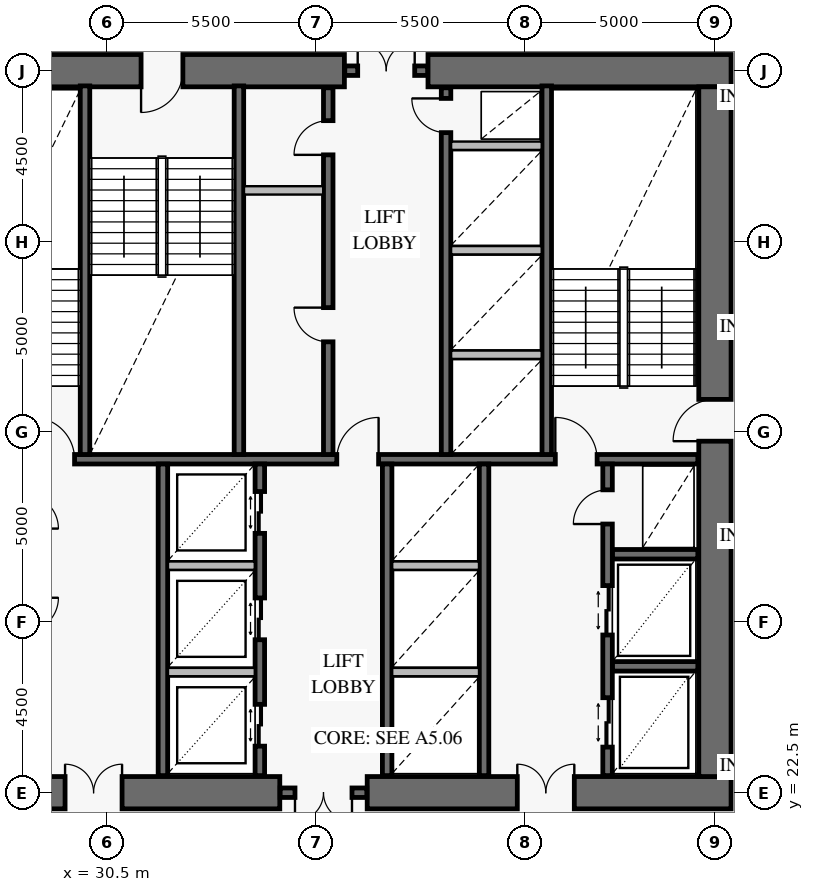
"""IFC4 building model, lengths in metres.
Left out: names, types, materials, properties, quantities, classifications, styles, units other than length and angle.
Written with IfcOpenShell. Run it as: python <this file> out.ifc"""

import sys

from ifc_helpers import new_model, si_unit, direction, frame, frame_2d, origin, place, context, subcontext, project, spatial, rectangle, extrude, element, fill, save


model = new_model("IFC4")
c1 = context("Model", 3, precision=1e-05, world=origin(), true_north=direction((0.0, 1.0)))
c2 = subcontext(c1, "Body", "Model", "MODEL_VIEW")
j1 = project(units=[si_unit("LENGTHUNIT", "METRE"), si_unit("PLANEANGLEUNIT", "RADIAN")], contexts=[c1])
p1 = place(None, origin())
s1 = spatial("IfcSite", under=j1, at=p1, CompositionType="ELEMENT")
p2 = place(p1, origin())
s2 = spatial("IfcBuilding", under=s1, at=p2, CompositionType="ELEMENT")
p3 = place(p2, frame((0.0, 0.0, 66.6)))
s3 = spatial("IfcBuildingStorey", under=s2, at=p3, CompositionType="ELEMENT", Elevation=66.6)
p4 = place(p3, frame((25.075, 22.5, 0.0), z_axis=(0.0, 0.0, 1.0), x_axis=(1.0, 0.0, 0.0)))
e1 = element("IfcWall", 1, at=p4, inside=s3, PredefinedType="SHEAR", context=c2, shape_type="SweptSolid", body=[
    extrude(rectangle(XDim=9.975, YDim=0.85, at=frame_2d((4.988, 0.0))), origin(), (0.0, 0.0, 1.0), 4.2),
])
p5 = place(p4, frame((4.325, 0.0, 0.0)))
e2 = element("IfcOpeningElement", 2, at=p5, cuts=e1, PredefinedType="OPENING", context=c2, shape_type="SweptSolid", body=[
    extrude(rectangle(XDim=1.5, YDim=2.15, at=frame_2d((0.75, 1.075))), frame((0.0, 0.437, 0.0), z_axis=(0.0, -1.0, 0.0), x_axis=(1.0, 0.0, 0.0)), (0.0, 0.0, 1.0), 0.874),
])
p6 = place(p3, frame((37.35, 22.5, 0.0), z_axis=(0.0, 0.0, 1.0), x_axis=(1.0, 0.0, 0.0)))
e3 = element("IfcWall", 3, at=p6, inside=s3, PredefinedType="SHEAR", context=c2, shape_type="SweptSolid", body=[
    extrude(rectangle(XDim=9.575, YDim=0.85, at=frame_2d((4.788, 0.0))), origin(), (0.0, 0.0, 1.0), 4.2),
])
p7 = place(p6, frame((3.95, 0.0, 0.0)))
e4 = element("IfcOpeningElement", 4, at=p7, cuts=e3, PredefinedType="OPENING", context=c2, shape_type="SweptSolid", body=[
    extrude(rectangle(XDim=1.5, YDim=2.15, at=frame_2d((0.75, 1.075))), frame((0.0, 0.437, 0.0), z_axis=(0.0, -1.0, 0.0), x_axis=(1.0, 0.0, 0.0)), (0.0, 0.0, 1.0), 0.874),
])
p8 = place(p3, frame((46.925, 41.5, 0.0), z_axis=(0.0, 0.0, 1.0), x_axis=(-1.0, 0.0, 0.0)))
e5 = element("IfcWall", 5, at=p8, inside=s3, PredefinedType="SHEAR", context=c2, shape_type="SweptSolid", body=[
    extrude(rectangle(XDim=7.975, YDim=0.85, at=frame_2d((3.988, 0.0))), origin(), (0.0, 0.0, 1.0), 4.2),
])
p9 = place(p3, frame((36.75, 41.5, 0.0), z_axis=(0.0, 0.0, 1.0), x_axis=(-1.0, 0.0, 0.0)))
e6 = element("IfcWall", 6, at=p9, inside=s3, PredefinedType="SHEAR", context=c2, shape_type="SweptSolid", body=[
    extrude(rectangle(XDim=11.675, YDim=0.85, at=frame_2d((5.837, 0.0))), origin(), (0.0, 0.0, 1.0), 4.2),
])
p10 = place(p9, frame((4.25, 0.0, 0.0)))
e7 = element("IfcOpeningElement", 7, at=p10, cuts=e6, PredefinedType="OPENING", context=c2, shape_type="SweptSolid", body=[
    extrude(rectangle(XDim=1.1, YDim=2.15, at=frame_2d((0.55, 1.075))), frame((0.0, 0.437, 0.0), z_axis=(0.0, -1.0, 0.0), x_axis=(1.0, 0.0, 0.0)), (0.0, 0.0, 1.0), 0.874),
])
p11 = place(p3, frame((46.5, 22.925, 0.0), z_axis=(0.0, 0.0, 1.0), x_axis=(0.0, 1.0, 0.0)))
e8 = element("IfcWall", 8, at=p11, inside=s3, PredefinedType="SHEAR", context=c2, shape_type="SweptSolid", body=[
    extrude(rectangle(XDim=18.15, YDim=0.85, at=frame_2d((9.075, 0.0))), origin(), (0.0, 0.0, 1.0), 4.2),
])
p12 = place(p11, frame((8.825, 0.0, 0.0)))
e9 = element("IfcOpeningElement", 9, at=p12, cuts=e8, PredefinedType="OPENING", context=c2, shape_type="SweptSolid", body=[
    extrude(rectangle(XDim=1.1, YDim=2.15, at=frame_2d((0.55, 1.075))), frame((0.0, 0.437, 0.0), z_axis=(0.0, -1.0, 0.0), x_axis=(1.0, 0.0, 0.0)), (0.0, 0.0, 1.0), 0.874),
])
p13 = place(p3, frame((35.06, 22.5, 0.0), z_axis=(0.0, 0.0, 1.0), x_axis=(1.0, 0.0, 0.0)))
e10 = element("IfcWall", 10, at=p13, inside=s3, PredefinedType="SOLIDWALL", context=c2, shape_type="SweptSolid", body=[
    extrude(rectangle(XDim=2.28, YDim=0.25, at=frame_2d((1.14, 0.0))), origin(), (0.0, 0.0, 1.0), 4.2),
])
p14 = place(p13, frame((0.39, 0.0, 0.0)))
e11 = element("IfcOpeningElement", 11, at=p14, cuts=e10, PredefinedType="OPENING", context=c2, shape_type="SweptSolid", body=[
    extrude(rectangle(XDim=1.5, YDim=2.15, at=frame_2d((0.75, 1.075))), frame((0.0, 0.137, 0.0), z_axis=(0.0, -1.0, 0.0), x_axis=(1.0, 0.0, 0.0)), (0.0, 0.0, 1.0), 0.274),
])
p15 = place(p3, frame((36.76, 41.5, 0.0), z_axis=(0.0, 0.0, 1.0), x_axis=(1.0, 0.0, 0.0)))
e12 = element("IfcWall", 12, at=p15, inside=s3, PredefinedType="SOLIDWALL", context=c2, shape_type="SweptSolid", body=[
    extrude(rectangle(XDim=2.18, YDim=0.25, at=frame_2d((1.09, 0.0))), origin(), (0.0, 0.0, 1.0), 4.2),
])
p16 = place(p15, frame((0.34, 0.0, 0.0)))
e13 = element("IfcOpeningElement", 13, at=p16, cuts=e12, PredefinedType="OPENING", context=c2, shape_type="SweptSolid", body=[
    extrude(rectangle(XDim=1.5, YDim=2.15, at=frame_2d((0.75, 1.075))), frame((0.0, 0.137, 0.0), z_axis=(0.0, -1.0, 0.0), x_axis=(1.0, 0.0, 0.0)), (0.0, 0.0, 1.0), 0.274),
])
p17 = place(p3, frame((25.95, 31.275, 0.0), z_axis=(0.0, 0.0, 1.0), x_axis=(1.0, 0.0, 0.0)))
e14 = element("IfcWall", 14, at=p17, inside=s3, PredefinedType="SOLIDWALL", context=c2, shape_type="SweptSolid", body=[
    extrude(rectangle(XDim=20.1, YDim=0.25, at=frame_2d((10.05, 0.0))), origin(), (0.0, 0.0, 1.0), 4.2),
])
p18 = place(p17, frame((2.6, 0.0, 0.0)))
e15 = element("IfcOpeningElement", 15, at=p18, cuts=e14, PredefinedType="OPENING", context=c2, shape_type="SweptSolid", body=[
    extrude(rectangle(XDim=1.1, YDim=2.15, at=frame_2d((0.55, 1.075))), frame((0.0, 0.137, 0.0), z_axis=(0.0, -1.0, 0.0), x_axis=(1.0, 0.0, 0.0)), (0.0, 0.0, 1.0), 0.274),
])
p19 = place(p17, frame((10.6, 0.0, 0.0)))
e16 = element("IfcOpeningElement", 16, at=p19, cuts=e14, PredefinedType="OPENING", context=c2, shape_type="SweptSolid", body=[
    extrude(rectangle(XDim=1.1, YDim=2.15, at=frame_2d((0.55, 1.075))), frame((0.0, 0.137, 0.0), z_axis=(0.0, -1.0, 0.0), x_axis=(1.0, 0.0, 0.0)), (0.0, 0.0, 1.0), 0.274),
])
p20 = place(p17, frame((16.35, 0.0, 0.0)))
e17 = element("IfcOpeningElement", 17, at=p20, cuts=e14, PredefinedType="OPENING", context=c2, shape_type="SweptSolid", body=[
    extrude(rectangle(XDim=1.1, YDim=2.15, at=frame_2d((0.55, 1.075))), frame((0.0, 0.137, 0.0), z_axis=(0.0, -1.0, 0.0), x_axis=(1.0, 0.0, 0.0)), (0.0, 0.0, 1.0), 0.274),
])
for number, where, z_axis, x_axis in (
    (18, (29.925, 31.4, 0.0), (0.0, 0.0, 1.0), (0.0, 1.0, 0.0)),
    (19, (33.975, 31.4, 0.0), (0.0, 0.0, 1.0), (0.0, 1.0, 0.0)),
    (20, (42.075, 31.4, 0.0), (0.0, 0.0, 1.0), (0.0, 1.0, 0.0)),
):
    element("IfcWall", number, at=place(p3, frame(where, z_axis=z_axis, x_axis=x_axis)), inside=s3, PredefinedType="SOLIDWALL", context=c2, shape_type="SweptSolid", body=[
        extrude(rectangle(XDim=9.7, YDim=0.25, at=frame_2d((4.85, 0.0))), origin(), (0.0, 0.0, 1.0), 4.2),
    ])
p21 = place(p3, frame((36.325, 31.4, 0.0), z_axis=(0.0, 0.0, 1.0), x_axis=(0.0, 1.0, 0.0)))
e21 = element("IfcWall", 21, at=p21, inside=s3, PredefinedType="SOLIDWALL", context=c2, shape_type="SweptSolid", body=[
    extrude(rectangle(XDim=9.65, YDim=0.25, at=frame_2d((4.825, 0.0))), origin(), (0.0, 0.0, 1.0), 4.2),
])
p22 = place(p21, frame((2.965, 0.0, 0.0)))
e22 = element("IfcOpeningElement", 22, at=p22, cuts=e21, PredefinedType="OPENING", context=c2, shape_type="SweptSolid", body=[
    extrude(rectangle(XDim=0.9, YDim=2.1, at=frame_2d((0.45, 1.05))), frame((0.0, 0.137, 0.0), z_axis=(0.0, -1.0, 0.0), x_axis=(1.0, 0.0, 0.0)), (0.0, 0.0, 1.0), 0.274),
])
p23 = place(p21, frame((7.885, 0.0, 0.0)))
e23 = element("IfcOpeningElement", 23, at=p23, cuts=e21, PredefinedType="OPENING", context=c2, shape_type="SweptSolid", body=[
    extrude(rectangle(XDim=0.9, YDim=2.1, at=frame_2d((0.45, 1.05))), frame((0.0, 0.137, 0.0), z_axis=(0.0, -1.0, 0.0), x_axis=(1.0, 0.0, 0.0)), (0.0, 0.0, 1.0), 0.274),
])
p24 = place(p3, frame((39.425, 31.4, 0.0), z_axis=(0.0, 0.0, 1.0), x_axis=(0.0, 1.0, 0.0)))
e24 = element("IfcWall", 24, at=p24, inside=s3, PredefinedType="SOLIDWALL", context=c2, shape_type="SweptSolid", body=[
    extrude(rectangle(XDim=9.65, YDim=0.25, at=frame_2d((4.825, 0.0))), origin(), (0.0, 0.0, 1.0), 4.2),
])
p25 = place(p24, frame((8.47, 0.0, 0.0)))
e25 = element("IfcOpeningElement", 25, at=p25, cuts=e24, PredefinedType="OPENING", context=c2, shape_type="SweptSolid", body=[
    extrude(rectangle(XDim=0.9, YDim=2.1, at=frame_2d((0.45, 1.05))), frame((0.0, 0.137, 0.0), z_axis=(0.0, -1.0, 0.0), x_axis=(1.0, 0.0, 0.0)), (0.0, 0.0, 1.0), 0.274),
])
p26 = place(p3, frame((31.975, 22.95, 0.0), z_axis=(0.0, 0.0, 1.0), x_axis=(0.0, 1.0, 0.0)))
e26 = element("IfcWall", 26, at=p26, inside=s3, PredefinedType="SOLIDWALL", context=c2, shape_type="SweptSolid", body=[
    extrude(rectangle(XDim=8.2, YDim=0.25, at=frame_2d((4.1, 0.0))), origin(), (0.0, 0.0, 1.0), 4.2),
])
p27 = place(p3, frame((34.525, 22.95, 0.0), z_axis=(0.0, 0.0, 1.0), x_axis=(0.0, 1.0, 0.0)))
e27 = element("IfcWall", 27, at=p27, inside=s3, PredefinedType="SOLIDWALL", context=c2, shape_type="SweptSolid", body=[
    extrude(rectangle(XDim=8.2, YDim=0.25, at=frame_2d((4.1, 0.0))), origin(), (0.0, 0.0, 1.0), 4.2),
])
p28 = place(p27, frame((0.775, 0.0, 0.0)))
e28 = element("IfcOpeningElement", 28, at=p28, cuts=e27, PredefinedType="OPENING", context=c2, shape_type="SweptSolid", body=[
    extrude(rectangle(XDim=1.1, YDim=2.2, at=frame_2d((0.55, 1.1))), frame((0.0, 0.137, 0.0), z_axis=(0.0, -1.0, 0.0), x_axis=(1.0, 0.0, 0.0)), (0.0, 0.0, 1.0), 0.274),
])
p29 = place(p27, frame((3.575, 0.0, 0.0)))
e29 = element("IfcOpeningElement", 29, at=p29, cuts=e27, PredefinedType="OPENING", context=c2, shape_type="SweptSolid", body=[
    extrude(rectangle(XDim=1.1, YDim=2.2, at=frame_2d((0.55, 1.1))), frame((0.0, 0.137, 0.0), z_axis=(0.0, -1.0, 0.0), x_axis=(1.0, 0.0, 0.0)), (0.0, 0.0, 1.0), 0.274),
])
p30 = place(p27, frame((6.375, 0.0, 0.0)))
e30 = element("IfcOpeningElement", 30, at=p30, cuts=e27, PredefinedType="OPENING", context=c2, shape_type="SweptSolid", body=[
    extrude(rectangle(XDim=1.1, YDim=2.2, at=frame_2d((0.55, 1.1))), frame((0.0, 0.137, 0.0), z_axis=(0.0, -1.0, 0.0), x_axis=(1.0, 0.0, 0.0)), (0.0, 0.0, 1.0), 0.274),
])
for number, where, z_axis, x_axis in (
    (31, (37.875, 22.95, 0.0), (0.0, 0.0, 1.0), (0.0, 1.0, 0.0)),
    (32, (40.425, 22.95, 0.0), (0.0, 0.0, 1.0), (0.0, 1.0, 0.0)),
):
    element("IfcWall", number, at=place(p3, frame(where, z_axis=z_axis, x_axis=x_axis)), inside=s3, PredefinedType="SOLIDWALL", context=c2, shape_type="SweptSolid", body=[
        extrude(rectangle(XDim=8.2, YDim=0.25, at=frame_2d((4.1, 0.0))), origin(), (0.0, 0.0, 1.0), 4.2),
    ])
for number, where, z_axis, x_axis in (
    (33, (43.8, 25.825, 0.0), (0.0, 0.0, 1.0), (1.0, 0.0, 0.0)),
    (34, (43.8, 28.775, 0.0), (0.0, 0.0, 1.0), (1.0, 0.0, 0.0)),
):
    element("IfcWall", number, at=place(p3, frame(where, z_axis=z_axis, x_axis=x_axis)), inside=s3, PredefinedType="SOLIDWALL", context=c2, shape_type="SweptSolid", body=[
        extrude(rectangle(XDim=2.25, YDim=0.25, at=frame_2d((1.125, 0.0))), origin(), (0.0, 0.0, 1.0), 4.2),
    ])
p31 = place(p3, frame((43.675, 22.95, 0.0), z_axis=(0.0, 0.0, 1.0), x_axis=(0.0, 1.0, 0.0)))
e35 = element("IfcWall", 35, at=p31, inside=s3, PredefinedType="SOLIDWALL", context=c2, shape_type="SweptSolid", body=[
    extrude(rectangle(XDim=8.2, YDim=0.25, at=frame_2d((4.1, 0.0))), origin(), (0.0, 0.0, 1.0), 4.2),
])
p32 = place(p31, frame((0.75, 0.0, 0.0)))
e36 = element("IfcOpeningElement", 36, at=p32, cuts=e35, PredefinedType="OPENING", context=c2, shape_type="SweptSolid", body=[
    extrude(rectangle(XDim=1.3, YDim=2.3, at=frame_2d((0.65, 1.15))), frame((0.0, 0.137, 0.0), z_axis=(0.0, -1.0, 0.0), x_axis=(1.0, 0.0, 0.0)), (0.0, 0.0, 1.0), 0.274),
])
p33 = place(p31, frame((3.7, 0.0, 0.0)))
e37 = element("IfcOpeningElement", 37, at=p33, cuts=e35, PredefinedType="OPENING", context=c2, shape_type="SweptSolid", body=[
    extrude(rectangle(XDim=1.3, YDim=2.3, at=frame_2d((0.65, 1.15))), frame((0.0, 0.137, 0.0), z_axis=(0.0, -1.0, 0.0), x_axis=(1.0, 0.0, 0.0)), (0.0, 0.0, 1.0), 0.274),
])
p34 = place(p31, frame((6.62, 0.0, 0.0)))
e38 = element("IfcOpeningElement", 38, at=p34, cuts=e35, PredefinedType="OPENING", context=c2, shape_type="SweptSolid", body=[
    extrude(rectangle(XDim=0.9, YDim=2.1, at=frame_2d((0.45, 1.05))), frame((0.0, 0.137, 0.0), z_axis=(0.0, -1.0, 0.0), x_axis=(1.0, 0.0, 0.0)), (0.0, 0.0, 1.0), 0.274),
])
p35 = place(p3, frame((34.108, 38.35, 0.0), z_axis=(0.0, 0.0, 1.0), x_axis=(1.0, 0.0, 0.0)))
e39 = element("IfcWall", 39, at=p35, inside=s3, PredefinedType="PARTITIONING", context=c2, shape_type="SweptSolid", body=[
    extrude(rectangle(XDim=2.084, YDim=0.22, at=frame_2d((1.042, 0.0))), origin(), (0.0, 0.0, 1.0), 3.92),
])
for number, where, z_axis, x_axis in (
    (40, (39.558, 34.025, 0.0), (0.0, 0.0, 1.0), (1.0, 0.0, 0.0)),
    (41, (39.558, 36.775, 0.0), (0.0, 0.0, 1.0), (1.0, 0.0, 0.0)),
    (42, (39.558, 39.525, 0.0), (0.0, 0.0, 1.0), (1.0, 0.0, 0.0)),
):
    element("IfcWall", number, at=place(p3, frame(where, z_axis=z_axis, x_axis=x_axis)), inside=s3, PredefinedType="PARTITIONING", context=c2, shape_type="SweptSolid", body=[
        extrude(rectangle(XDim=2.384, YDim=0.22, at=frame_2d((1.192, 0.0))), origin(), (0.0, 0.0, 1.0), 3.92),
    ])
for number, where, z_axis, x_axis in (
    (43, (32.108, 25.675, 0.0), (0.0, 0.0, 1.0), (1.0, 0.0, 0.0)),
    (44, (32.108, 28.475, 0.0), (0.0, 0.0, 1.0), (1.0, 0.0, 0.0)),
):
    element("IfcWall", number, at=place(p3, frame(where, z_axis=z_axis, x_axis=x_axis)), inside=s3, PredefinedType="PARTITIONING", context=c2, shape_type="SweptSolid", body=[
        extrude(rectangle(XDim=2.284, YDim=0.22, at=frame_2d((1.142, 0.0))), origin(), (0.0, 0.0, 1.0), 3.92),
    ])
for number, where, z_axis, x_axis in (
    (45, (38.008, 25.675, 0.0), (0.0, 0.0, 1.0), (1.0, 0.0, 0.0)),
    (46, (38.008, 28.475, 0.0), (0.0, 0.0, 1.0), (1.0, 0.0, 0.0)),
):
    element("IfcWall", number, at=place(p3, frame(where, z_axis=z_axis, x_axis=x_axis)), inside=s3, PredefinedType="PARTITIONING", context=c2, shape_type="SweptSolid", body=[
        extrude(rectangle(XDim=2.284, YDim=0.22, at=frame_2d((1.142, 0.0))), origin(), (0.0, 0.0, 1.0), 3.92),
    ])
p36 = place(p12, origin())
e47 = element("IfcDoor", 47, at=p36, inside=s3, OperationType="SINGLE_SWING_LEFT", PredefinedType="USERDEFINED", context=c2, shape_type="SweptSolid", body=[
    extrude(rectangle(XDim=1.1, YDim=2.15, at=frame_2d((0.55, 1.075))), frame((0.0, 0.025, 0.0), z_axis=(0.0, -1.0, 0.0), x_axis=(1.0, 0.0, 0.0)), (0.0, 0.0, 1.0), 0.05),
])
fill(e9, e47)
p37 = place(p10, origin())
e48 = element("IfcDoor", 48, at=p37, inside=s3, OperationType="SINGLE_SWING_RIGHT", PredefinedType="USERDEFINED", context=c2, shape_type="SweptSolid", body=[
    extrude(rectangle(XDim=1.1, YDim=2.15, at=frame_2d((0.55, 1.075))), frame((0.0, 0.025, 0.0), z_axis=(0.0, -1.0, 0.0), x_axis=(1.0, 0.0, 0.0)), (0.0, 0.0, 1.0), 0.05),
])
fill(e7, e48)
p38 = place(p5, origin())
e49 = element("IfcDoor", 49, at=p38, inside=s3, OperationType="DOUBLE_DOOR_SINGLE_SWING", PredefinedType="DOOR", context=c2, shape_type="SweptSolid", body=[
    extrude(rectangle(XDim=1.5, YDim=2.15, at=frame_2d((0.75, 1.075))), frame((0.0, 0.025, 0.0), z_axis=(0.0, -1.0, 0.0), x_axis=(1.0, 0.0, 0.0)), (0.0, 0.0, 1.0), 0.05),
])
fill(e2, e49)
p39 = place(p7, origin())
e50 = element("IfcDoor", 50, at=p39, inside=s3, OperationType="DOUBLE_DOOR_SINGLE_SWING", PredefinedType="DOOR", context=c2, shape_type="SweptSolid", body=[
    extrude(rectangle(XDim=1.5, YDim=2.15, at=frame_2d((0.75, 1.075))), frame((0.0, 0.025, 0.0), z_axis=(0.0, -1.0, 0.0), x_axis=(1.0, 0.0, 0.0)), (0.0, 0.0, 1.0), 0.05),
])
fill(e4, e50)
p40 = place(p14, frame((1.5, 0.0, 0.0), z_axis=(0.0, 0.0, 1.0), x_axis=(-1.0, 0.0, 0.0)))
e51 = element("IfcDoor", 51, at=p40, inside=s3, OperationType="DOUBLE_DOOR_SINGLE_SWING", PredefinedType="DOOR", context=c2, shape_type="SweptSolid", body=[
    extrude(rectangle(XDim=1.5, YDim=2.15, at=frame_2d((0.75, 1.075))), frame((0.0, 0.025, 0.0), z_axis=(0.0, -1.0, 0.0), x_axis=(1.0, 0.0, 0.0)), (0.0, 0.0, 1.0), 0.05),
])
fill(e11, e51)
p41 = place(p16, origin())
e52 = element("IfcDoor", 52, at=p41, inside=s3, OperationType="DOUBLE_DOOR_SINGLE_SWING", PredefinedType="DOOR", context=c2, shape_type="SweptSolid", body=[
    extrude(rectangle(XDim=1.5, YDim=2.15, at=frame_2d((0.75, 1.075))), frame((0.0, 0.025, 0.0), z_axis=(0.0, -1.0, 0.0), x_axis=(1.0, 0.0, 0.0)), (0.0, 0.0, 1.0), 0.05),
])
fill(e13, e52)
p42 = place(p18, origin())
e53 = element("IfcDoor", 53, at=p42, inside=s3, OperationType="SINGLE_SWING_LEFT", PredefinedType="USERDEFINED", context=c2, shape_type="SweptSolid", body=[
    extrude(rectangle(XDim=1.1, YDim=2.15, at=frame_2d((0.55, 1.075))), frame((0.0, 0.025, 0.0), z_axis=(0.0, -1.0, 0.0), x_axis=(1.0, 0.0, 0.0)), (0.0, 0.0, 1.0), 0.05),
])
fill(e15, e53)
p43 = place(p19, origin())
e54 = element("IfcDoor", 54, at=p43, inside=s3, OperationType="SINGLE_SWING_RIGHT", PredefinedType="USERDEFINED", context=c2, shape_type="SweptSolid", body=[
    extrude(rectangle(XDim=1.1, YDim=2.15, at=frame_2d((0.55, 1.075))), frame((0.0, 0.025, 0.0), z_axis=(0.0, -1.0, 0.0), x_axis=(1.0, 0.0, 0.0)), (0.0, 0.0, 1.0), 0.05),
])
fill(e16, e54)
p44 = place(p20, origin())
e55 = element("IfcDoor", 55, at=p44, inside=s3, OperationType="SINGLE_SWING_LEFT", PredefinedType="USERDEFINED", context=c2, shape_type="SweptSolid", body=[
    extrude(rectangle(XDim=1.1, YDim=2.15, at=frame_2d((0.55, 1.075))), frame((0.0, 0.025, 0.0), z_axis=(0.0, -1.0, 0.0), x_axis=(1.0, 0.0, 0.0)), (0.0, 0.0, 1.0), 0.05),
])
fill(e17, e55)
p45 = place(p22, origin())
e56 = element("IfcDoor", 56, at=p45, inside=s3, OperationType="SINGLE_SWING_RIGHT", PredefinedType="DOOR", context=c2, shape_type="SweptSolid", body=[
    extrude(rectangle(XDim=0.9, YDim=2.1, at=frame_2d((0.45, 1.05))), frame((0.0, 0.025, 0.0), z_axis=(0.0, -1.0, 0.0), x_axis=(1.0, 0.0, 0.0)), (0.0, 0.0, 1.0), 0.05),
])
fill(e22, e56)
p46 = place(p23, origin())
e57 = element("IfcDoor", 57, at=p46, inside=s3, OperationType="SINGLE_SWING_LEFT", PredefinedType="DOOR", context=c2, shape_type="SweptSolid", body=[
    extrude(rectangle(XDim=0.9, YDim=2.1, at=frame_2d((0.45, 1.05))), frame((0.0, 0.025, 0.0), z_axis=(0.0, -1.0, 0.0), x_axis=(1.0, 0.0, 0.0)), (0.0, 0.0, 1.0), 0.05),
])
fill(e23, e57)
p47 = place(p25, origin())
e58 = element("IfcDoor", 58, at=p47, inside=s3, OperationType="SINGLE_SWING_RIGHT", PredefinedType="DOOR", context=c2, shape_type="SweptSolid", body=[
    extrude(rectangle(XDim=0.9, YDim=2.1, at=frame_2d((0.45, 1.05))), frame((0.0, 0.025, 0.0), z_axis=(0.0, -1.0, 0.0), x_axis=(1.0, 0.0, 0.0)), (0.0, 0.0, 1.0), 0.05),
])
fill(e25, e58)
p48 = place(p28, frame((1.1, 0.0, 0.0), z_axis=(0.0, 0.0, 1.0), x_axis=(-1.0, 0.0, 0.0)))
e59 = element("IfcDoor", 59, at=p48, inside=s3, OperationType="DOUBLE_DOOR_SLIDING", PredefinedType="DOOR", context=c2, shape_type="SweptSolid", body=[
    extrude(rectangle(XDim=1.1, YDim=2.2, at=frame_2d((0.55, 1.1))), frame((0.0, 0.025, 0.0), z_axis=(0.0, -1.0, 0.0), x_axis=(1.0, 0.0, 0.0)), (0.0, 0.0, 1.0), 0.05),
])
fill(e28, e59)
p49 = place(p29, frame((1.1, 0.0, 0.0), z_axis=(0.0, 0.0, 1.0), x_axis=(-1.0, 0.0, 0.0)))
e60 = element("IfcDoor", 60, at=p49, inside=s3, OperationType="DOUBLE_DOOR_SLIDING", PredefinedType="DOOR", context=c2, shape_type="SweptSolid", body=[
    extrude(rectangle(XDim=1.1, YDim=2.2, at=frame_2d((0.55, 1.1))), frame((0.0, 0.025, 0.0), z_axis=(0.0, -1.0, 0.0), x_axis=(1.0, 0.0, 0.0)), (0.0, 0.0, 1.0), 0.05),
])
fill(e29, e60)
p50 = place(p30, frame((1.1, 0.0, 0.0), z_axis=(0.0, 0.0, 1.0), x_axis=(-1.0, 0.0, 0.0)))
e61 = element("IfcDoor", 61, at=p50, inside=s3, OperationType="DOUBLE_DOOR_SLIDING", PredefinedType="DOOR", context=c2, shape_type="SweptSolid", body=[
    extrude(rectangle(XDim=1.1, YDim=2.2, at=frame_2d((0.55, 1.1))), frame((0.0, 0.025, 0.0), z_axis=(0.0, -1.0, 0.0), x_axis=(1.0, 0.0, 0.0)), (0.0, 0.0, 1.0), 0.05),
])
fill(e30, e61)
p51 = place(p32, origin())
e62 = element("IfcDoor", 62, at=p51, inside=s3, OperationType="DOUBLE_DOOR_SLIDING", PredefinedType="DOOR", context=c2, shape_type="SweptSolid", body=[
    extrude(rectangle(XDim=1.3, YDim=2.3, at=frame_2d((0.65, 1.15))), frame((0.0, 0.025, 0.0), z_axis=(0.0, -1.0, 0.0), x_axis=(1.0, 0.0, 0.0)), (0.0, 0.0, 1.0), 0.05),
])
fill(e36, e62)
p52 = place(p33, origin())
e63 = element("IfcDoor", 63, at=p52, inside=s3, OperationType="DOUBLE_DOOR_SLIDING", PredefinedType="DOOR", context=c2, shape_type="SweptSolid", body=[
    extrude(rectangle(XDim=1.3, YDim=2.3, at=frame_2d((0.65, 1.15))), frame((0.0, 0.025, 0.0), z_axis=(0.0, -1.0, 0.0), x_axis=(1.0, 0.0, 0.0)), (0.0, 0.0, 1.0), 0.05),
])
fill(e37, e63)
p53 = place(p34, origin())
e64 = element("IfcDoor", 64, at=p53, inside=s3, OperationType="SINGLE_SWING_LEFT", PredefinedType="DOOR", context=c2, shape_type="SweptSolid", body=[
    extrude(rectangle(XDim=0.9, YDim=2.1, at=frame_2d((0.45, 1.05))), frame((0.0, 0.025, 0.0), z_axis=(0.0, -1.0, 0.0), x_axis=(1.0, 0.0, 0.0)), (0.0, 0.0, 1.0), 0.05),
])
fill(e38, e64)
save(model, sys.argv[1])
